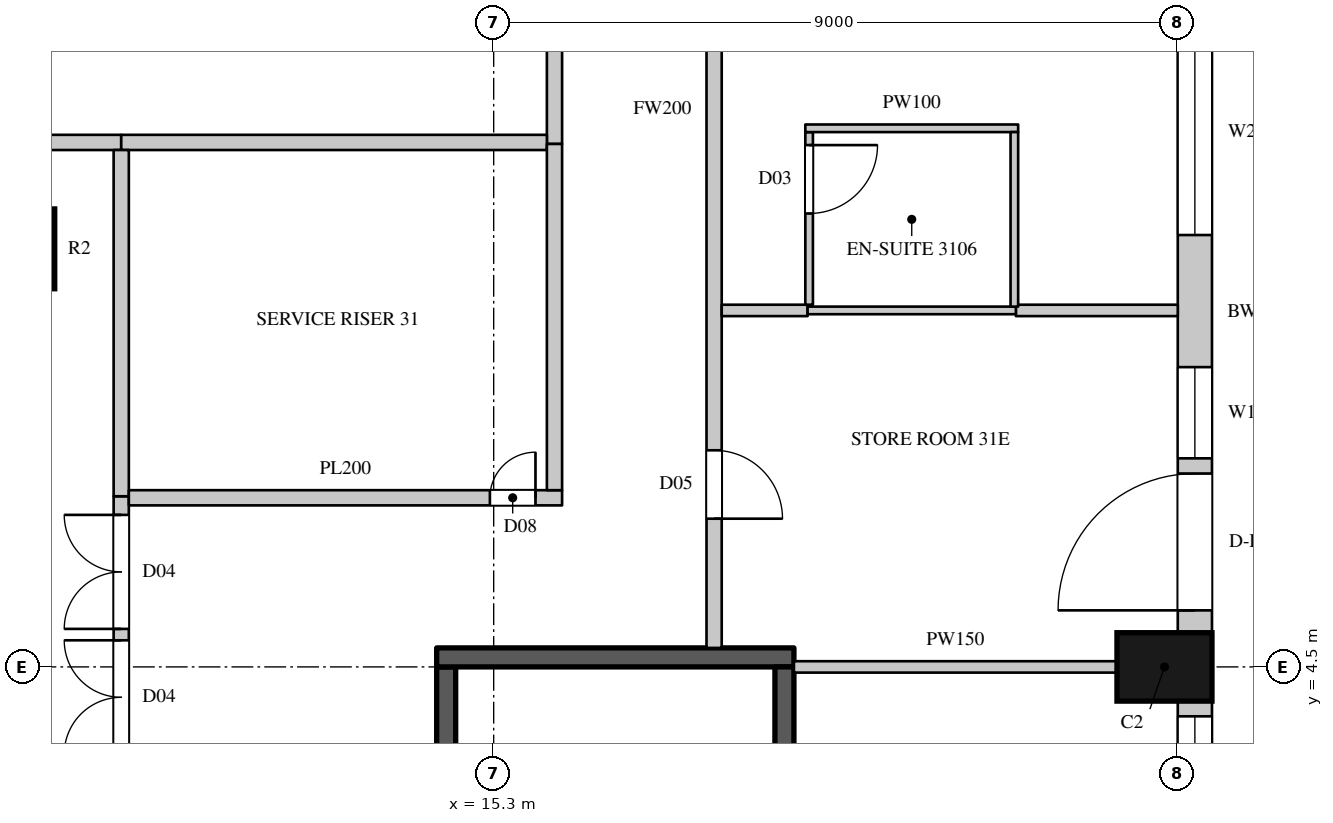
"""IFC4 building model, lengths in metres.
Left out: names, types, materials, properties, quantities, classifications, styles, units other than length and angle.
Written with IfcOpenShell. Run it as: python <this file> out.ifc"""

import sys

from ifc_helpers import new_model, si_unit, direction, frame, frame_2d, origin, origin_2d, place, context, subcontext, project, spatial, rectangle, circle, extrude, element, fill, save


model = new_model("IFC4")
c1 = context("Model", 3, precision=1e-05, world=origin(), true_north=direction((0.0, 1.0)))
c2 = subcontext(c1, "Body", "Model", "MODEL_VIEW")
j1 = project(units=[si_unit("LENGTHUNIT", "METRE"), si_unit("PLANEANGLEUNIT", "RADIAN")], contexts=[c1])
p1 = place(None, origin())
s1 = spatial("IfcSite", under=j1, at=p1, CompositionType="ELEMENT")
p2 = place(p1, origin())
s2 = spatial("IfcBuilding", under=s1, at=p2, CompositionType="ELEMENT")
p3 = place(p2, frame((0.0, 0.0, 141.9)))
s3 = spatial("IfcBuildingStorey", under=s2, at=p3, CompositionType="ELEMENT", Elevation=141.9)
p4 = place(p3, frame((24.125, 4.5, 0.0), z_axis=(0.0, 0.0, 1.0), x_axis=(0.0, 1.0, 0.0)))
e1 = element("IfcColumn", 1, at=p4, inside=s3, PredefinedType="COLUMN", context=c2, shape_type="SweptSolid", body=[
    extrude(rectangle(XDim=0.9, YDim=1.25, at=origin_2d()), origin(), (0.0, 0.0, 1.0), 3.6),
])
p5 = place(p3, frame((9.0, 10.0, 0.0), z_axis=(0.0, 0.0, 1.0), x_axis=(1.0, 0.0, 0.0)))
e2 = element("IfcColumn", 2, at=p5, inside=s3, PredefinedType="COLUMN", context=c2, shape_type="SweptSolid", body=[
    extrude(circle(Radius=0.525, at=origin_2d()), origin(), (0.0, 0.0, 1.0), 3.6),
])
p6 = place(p3, frame((24.525, -4.05, 0.0), z_axis=(0.0, 0.0, 1.0), x_axis=(0.0, 1.0, 0.0)))
e3 = element("IfcWall", 3, at=p6, inside=s3, PredefinedType="SOLIDWALL", context=c2, shape_type="SweptSolid", body=[
    extrude(rectangle(XDim=8.1, YDim=0.45, at=frame_2d((4.05, 0.0))), origin(), (0.0, 0.0, 1.0), 3.3),
])
p7 = place(p6, frame((0.2, 0.0, 0.0)))
e4 = element("IfcOpeningElement", 4, at=p7, cuts=e3, PredefinedType="OPENING", context=c2, shape_type="SweptSolid", body=[
    extrude(rectangle(XDim=1.8, YDim=2.4, at=frame_2d((0.9, 1.2))), frame((0.0, 0.235, 0.0), z_axis=(0.0, -1.0, 0.0), x_axis=(1.0, 0.0, 0.0)), (0.0, 0.0, 1.0), 0.47),
])
p8 = place(p6, frame((2.2, 0.0, 1.05)))
e5 = element("IfcOpeningElement", 5, at=p8, cuts=e3, PredefinedType="OPENING", context=c2, shape_type="SweptSolid", body=[
    extrude(rectangle(XDim=1.2, YDim=2.0, at=frame_2d((0.6, 1.0))), frame((0.0, 0.235, 0.0), z_axis=(0.0, -1.0, 0.0), x_axis=(1.0, 0.0, 0.0)), (0.0, 0.0, 1.0), 0.47),
])
p9 = place(p6, frame((4.7, 0.0, 0.0)))
e6 = element("IfcOpeningElement", 6, at=p9, cuts=e3, PredefinedType="OPENING", context=c2, shape_type="SweptSolid", body=[
    extrude(rectangle(XDim=1.8, YDim=2.4, at=frame_2d((0.9, 1.2))), frame((0.0, 0.235, 0.0), z_axis=(0.0, -1.0, 0.0), x_axis=(1.0, 0.0, 0.0)), (0.0, 0.0, 1.0), 0.47),
])
p10 = place(p6, frame((6.7, 0.0, 1.05)))
e7 = element("IfcOpeningElement", 7, at=p10, cuts=e3, PredefinedType="OPENING", context=c2, shape_type="SweptSolid", body=[
    extrude(rectangle(XDim=1.2, YDim=2.0, at=frame_2d((0.6, 1.0))), frame((0.0, 0.235, 0.0), z_axis=(0.0, -1.0, 0.0), x_axis=(1.0, 0.0, 0.0)), (0.0, 0.0, 1.0), 0.47),
])
p11 = place(p3, frame((24.525, 4.95, 0.0), z_axis=(0.0, 0.0, 1.0), x_axis=(0.0, 1.0, 0.0)))
e8 = element("IfcWall", 8, at=p11, inside=s3, PredefinedType="SOLIDWALL", context=c2, shape_type="SweptSolid", body=[
    extrude(rectangle(XDim=8.439, YDim=0.45, at=frame_2d((4.219, 0.0))), origin(), (0.0, 0.0, 1.0), 3.3),
])
p12 = place(p11, frame((0.294, 0.0, 0.0)))
e9 = element("IfcOpeningElement", 9, at=p12, cuts=e8, PredefinedType="OPENING", context=c2, shape_type="SweptSolid", body=[
    extrude(rectangle(XDim=1.8, YDim=2.4, at=frame_2d((0.9, 1.2))), frame((0.0, 0.235, 0.0), z_axis=(0.0, -1.0, 0.0), x_axis=(1.0, 0.0, 0.0)), (0.0, 0.0, 1.0), 0.47),
])
p13 = place(p11, frame((2.294, 0.0, 1.05)))
e10 = element("IfcOpeningElement", 10, at=p13, cuts=e8, PredefinedType="OPENING", context=c2, shape_type="SweptSolid", body=[
    extrude(rectangle(XDim=1.2, YDim=2.0, at=frame_2d((0.6, 1.0))), frame((0.0, 0.235, 0.0), z_axis=(0.0, -1.0, 0.0), x_axis=(1.0, 0.0, 0.0)), (0.0, 0.0, 1.0), 0.47),
])
p14 = place(p11, frame((5.232, 0.0, 1.05)))
e11 = element("IfcOpeningElement", 11, at=p14, cuts=e8, PredefinedType="OPENING", context=c2, shape_type="SweptSolid", body=[
    extrude(rectangle(XDim=2.7, YDim=2.0, at=frame_2d((1.35, 1.0))), frame((0.0, 0.235, 0.0), z_axis=(0.0, -1.0, 0.0), x_axis=(1.0, 0.0, 0.0)), (0.0, 0.0, 1.0), 0.47),
])
p15 = place(p3, frame((-8.3, 11.4, 0.0), z_axis=(0.0, 0.0, 1.0), x_axis=(1.0, 0.0, 0.0)))
e12 = element("IfcWall", 12, at=p15, inside=s3, PredefinedType="PARTITIONING", context=c2, shape_type="SweptSolid", body=[
    extrude(rectangle(XDim=18.7, YDim=0.2, at=frame_2d((9.35, 0.0))), origin(), (0.0, 0.0, 1.0), 3.3),
])
p16 = place(p15, frame((6.9, 0.0, 0.0)))
e13 = element("IfcOpeningElement", 13, at=p16, cuts=e12, PredefinedType="OPENING", context=c2, shape_type="SweptSolid", body=[
    extrude(rectangle(XDim=1.5, YDim=2.2, at=frame_2d((0.75, 1.1))), frame((0.0, 0.11, 0.0), z_axis=(0.0, -1.0, 0.0), x_axis=(1.0, 0.0, 0.0)), (0.0, 0.0, 1.0), 0.22),
])
p17 = place(p3, frame((10.4, -11.3, 0.0), z_axis=(0.0, 0.0, 1.0), x_axis=(0.0, 1.0, 0.0)))
e14 = element("IfcWall", 14, at=p17, inside=s3, PredefinedType="PARTITIONING", context=c2, shape_type="SweptSolid", body=[
    extrude(rectangle(XDim=18.045, YDim=0.2, at=frame_2d((9.022, 0.0))), origin(), (0.0, 0.0, 1.0), 3.3),
])
p18 = place(p17, frame((16.3, 0.0, 0.0)))
e15 = element("IfcOpeningElement", 15, at=p18, cuts=e14, PredefinedType="OPENING", context=c2, shape_type="SweptSolid", body=[
    extrude(rectangle(XDim=1.5, YDim=2.2, at=frame_2d((0.75, 1.1))), frame((0.0, 0.11, 0.0), z_axis=(0.0, -1.0, 0.0), x_axis=(1.0, 0.0, 0.0)), (0.0, 0.0, 1.0), 0.22),
])
p19 = place(p17, frame((14.65, 0.0, 0.0)))
e16 = element("IfcOpeningElement", 16, at=p19, cuts=e14, PredefinedType="OPENING", context=c2, shape_type="SweptSolid", body=[
    extrude(rectangle(XDim=1.5, YDim=2.2, at=frame_2d((0.75, 1.1))), frame((0.0, 0.11, 0.0), z_axis=(0.0, -1.0, 0.0), x_axis=(1.0, 0.0, 0.0)), (0.0, 0.0, 1.0), 0.22),
])
p20 = place(p17, frame((9.1, 0.0, 0.0)))
e17 = element("IfcOpeningElement", 17, at=p20, cuts=e14, PredefinedType="OPENING", context=c2, shape_type="SweptSolid", body=[
    extrude(rectangle(XDim=1.5, YDim=2.2, at=frame_2d((0.75, 1.1))), frame((0.0, 0.11, 0.0), z_axis=(0.0, -1.0, 0.0), x_axis=(1.0, 0.0, 0.0)), (0.0, 0.0, 1.0), 0.22),
])
p21 = place(p3, frame((16.1, 11.38, 0.0), z_axis=(0.0, 0.0, 1.0), x_axis=(0.0, 1.0, 0.0)))
e18 = element("IfcWall", 18, at=p21, inside=s3, PredefinedType="PARTITIONING", context=c2, shape_type="SweptSolid", body=[
    extrude(rectangle(XDim=6.02, YDim=0.2, at=frame_2d((3.01, 0.0))), origin(), (0.0, 0.0, 1.0), 3.3),
])
p22 = place(p3, frame((18.2, 4.75, 0.0), z_axis=(0.0, 0.0, 1.0), x_axis=(0.0, 1.0, 0.0)))
e19 = element("IfcWall", 19, at=p22, inside=s3, PredefinedType="PARTITIONING", context=c2, shape_type="SweptSolid", body=[
    extrude(rectangle(XDim=14.164, YDim=0.2, at=frame_2d((7.082, 0.0))), origin(), (0.0, 0.0, 1.0), 3.3),
])
p23 = place(p22, frame((1.7, 0.0, 0.0)))
e20 = element("IfcOpeningElement", 20, at=p23, cuts=e19, PredefinedType="OPENING", context=c2, shape_type="SweptSolid", body=[
    extrude(rectangle(XDim=0.9, YDim=2.2, at=frame_2d((0.45, 1.1))), frame((0.0, 0.11, 0.0), z_axis=(0.0, -1.0, 0.0), x_axis=(1.0, 0.0, 0.0)), (0.0, 0.0, 1.0), 0.22),
])
p24 = place(p3, frame((18.3, 9.19, 0.0), z_axis=(0.0, 0.0, 1.0), x_axis=(1.0, 0.0, 0.0)))
e21 = element("IfcWall", 21, at=p24, inside=s3, PredefinedType="PARTITIONING", context=c2, shape_type="SweptSolid", body=[
    extrude(rectangle(XDim=1.13, YDim=0.15, at=frame_2d((0.565, 0.0))), origin(), (0.0, 0.0, 1.0), 3.3),
])
p25 = place(p3, frame((19.25, 4.5, 0.0), z_axis=(0.0, 0.0, 1.0), x_axis=(1.0, 0.0, 0.0)))
e22 = element("IfcWall", 22, at=p25, inside=s3, PredefinedType="PARTITIONING", context=c2, shape_type="SweptSolid", body=[
    extrude(rectangle(XDim=4.25, YDim=0.15, at=frame_2d((2.125, 0.0))), origin(), (0.0, 0.0, 1.0), 3.3),
])
p26 = place(p3, frame((22.17, 9.19, 0.0), z_axis=(0.0, 0.0, 1.0), x_axis=(1.0, 0.0, 0.0)))
e23 = element("IfcWall", 23, at=p26, inside=s3, PredefinedType="PARTITIONING", context=c2, shape_type="SweptSolid", body=[
    extrude(rectangle(XDim=2.13, YDim=0.15, at=frame_2d((1.065, 0.0))), origin(), (0.0, 0.0, 1.0), 3.3),
])
p27 = place(p3, frame((10.4, 11.4, 0.0), z_axis=(0.0, 0.0, 1.0), x_axis=(1.0, 0.0, 0.0)))
e24 = element("IfcWall", 24, at=p27, inside=s3, PredefinedType="PARTITIONING", context=c2, shape_type="SweptSolid", body=[
    extrude(rectangle(XDim=5.6, YDim=0.2, at=frame_2d((2.8, 0.0))), origin(), (0.0, 0.0, 1.0), 3.3),
])
p28 = place(p3, frame((10.4, 6.745, 0.0), z_axis=(0.0, 0.0, 1.0), x_axis=(0.0, 1.0, 0.0)))
e25 = element("IfcWall", 25, at=p28, inside=s3, PredefinedType="PARTITIONING", context=c2, shape_type="SweptSolid", body=[
    extrude(rectangle(XDim=4.555, YDim=0.2, at=frame_2d((2.277, 0.0))), origin(), (0.0, 0.0, 1.0), 3.3),
])
p29 = place(p3, frame((10.5, 6.725, 0.0), z_axis=(0.0, 0.0, 1.0), x_axis=(1.0, 0.0, 0.0)))
e26 = element("IfcWall", 26, at=p29, inside=s3, PredefinedType="PARTITIONING", context=c2, shape_type="SweptSolid", body=[
    extrude(rectangle(XDim=5.7, YDim=0.2, at=frame_2d((2.85, 0.0))), origin(), (0.0, 0.0, 1.0), 3.3),
])
p30 = place(p29, frame((4.75, 0.0, 0.0)))
e27 = element("IfcOpeningElement", 27, at=p30, cuts=e26, PredefinedType="OPENING", context=c2, shape_type="SweptSolid", body=[
    extrude(rectangle(XDim=0.6, YDim=2.0, at=frame_2d((0.3, 1.0))), frame((0.0, 0.11, 0.0), z_axis=(0.0, -1.0, 0.0), x_axis=(1.0, 0.0, 0.0)), (0.0, 0.0, 1.0), 0.22),
])
p31 = place(p3, frame((16.1, 6.825, 0.0), z_axis=(0.0, 0.0, 1.0), x_axis=(0.0, 1.0, 0.0)))
e28 = element("IfcWall", 28, at=p31, inside=s3, PredefinedType="PARTITIONING", context=c2, shape_type="SweptSolid", body=[
    extrude(rectangle(XDim=4.555, YDim=0.2, at=frame_2d((2.277, 0.0))), origin(), (0.0, 0.0, 1.0), 3.3),
])
p32 = place(p3, frame((14.675, -4.5, 0.0), z_axis=(0.0, 0.0, 1.0), x_axis=(0.0, 1.0, 0.0)))
e29 = element("IfcWall", 29, at=p32, inside=s3, PredefinedType="SHEAR", context=c2, shape_type="SweptSolid", body=[
    extrude(rectangle(XDim=9.0, YDim=0.25, at=frame_2d((4.5, 0.0))), origin(), (0.0, 0.0, 1.0), 3.3),
])
p33 = place(p32, frame((0.45, 0.0, 0.0)))
e30 = element("IfcOpeningElement", 30, at=p33, cuts=e29, PredefinedType="OPENING", context=c2, shape_type="SweptSolid", body=[
    extrude(rectangle(XDim=1.1, YDim=2.2, at=frame_2d((0.55, 1.1))), frame((0.0, 0.135, 0.0), z_axis=(0.0, -1.0, 0.0), x_axis=(1.0, 0.0, 0.0)), (0.0, 0.0, 1.0), 0.27),
])
p34 = place(p3, frame((14.55, 4.625, 0.0), z_axis=(0.0, 0.0, 1.0), x_axis=(1.0, 0.0, 0.0)))
e31 = element("IfcWall", 31, at=p34, inside=s3, PredefinedType="SHEAR", context=c2, shape_type="SweptSolid", body=[
    extrude(rectangle(XDim=4.7, YDim=0.25, at=frame_2d((2.35, 0.0))), origin(), (0.0, 0.0, 1.0), 3.3),
])
p35 = place(p3, frame((19.125, -4.5, 0.0), z_axis=(0.0, 0.0, 1.0), x_axis=(0.0, 1.0, 0.0)))
e32 = element("IfcWall", 32, at=p35, inside=s3, PredefinedType="SHEAR", context=c2, shape_type="SweptSolid", body=[
    extrude(rectangle(XDim=9.0, YDim=0.25, at=frame_2d((4.5, 0.0))), origin(), (0.0, 0.0, 1.0), 3.3),
])
p36 = place(p3, frame((19.43, 9.19, 0.0), z_axis=(0.0, 0.0, 1.0), x_axis=(1.0, 0.0, 0.0)))
e33 = element("IfcWall", 33, at=p36, inside=s3, PredefinedType="PARTITIONING", context=c2, shape_type="SweptSolid", body=[
    extrude(rectangle(XDim=2.74, YDim=0.1, at=frame_2d((1.37, 0.0))), origin(), (0.0, 0.0, 1.0), 3.3),
])
p37 = place(p3, frame((19.45, 9.265, 0.0), z_axis=(0.0, 0.0, 1.0), x_axis=(0.0, 1.0, 0.0)))
e34 = element("IfcWall", 34, at=p37, inside=s3, PredefinedType="PARTITIONING", context=c2, shape_type="SweptSolid", body=[
    extrude(rectangle(XDim=2.271, YDim=0.1, at=frame_2d((1.135, 0.0))), origin(), (0.0, 0.0, 1.0), 3.3),
])
p38 = place(p37, frame((1.2, 0.0, 0.0)))
e35 = element("IfcOpeningElement", 35, at=p38, cuts=e34, PredefinedType="OPENING", context=c2, shape_type="SweptSolid", body=[
    extrude(rectangle(XDim=0.9, YDim=2.2, at=frame_2d((0.45, 1.1))), frame((0.0, 0.06, 0.0), z_axis=(0.0, -1.0, 0.0), x_axis=(1.0, 0.0, 0.0)), (0.0, 0.0, 1.0), 0.12),
])
p39 = place(p3, frame((19.4, 11.586, 0.0), z_axis=(0.0, 0.0, 1.0), x_axis=(1.0, 0.0, 0.0)))
e36 = element("IfcWall", 36, at=p39, inside=s3, PredefinedType="PARTITIONING", context=c2, shape_type="SweptSolid", body=[
    extrude(rectangle(XDim=2.8, YDim=0.1, at=frame_2d((1.4, 0.0))), origin(), (0.0, 0.0, 1.0), 3.3),
])
p40 = place(p3, frame((22.15, 9.24, 0.0), z_axis=(0.0, 0.0, 1.0), x_axis=(0.0, 1.0, 0.0)))
e37 = element("IfcWall", 37, at=p40, inside=s3, PredefinedType="PARTITIONING", context=c2, shape_type="SweptSolid", body=[
    extrude(rectangle(XDim=2.296, YDim=0.1, at=frame_2d((1.148, 0.0))), origin(), (0.0, 0.0, 1.0), 3.3),
])
p41 = place(p10, origin())
e38 = element("IfcWindow", 38, at=p41, inside=s3, PartitioningType="SINGLE_PANEL", PredefinedType="WINDOW", context=c2, shape_type="SweptSolid", body=[
    extrude(rectangle(XDim=1.2, YDim=2.0, at=frame_2d((0.6, 1.0))), frame((0.0, 0.135, 0.0), z_axis=(0.0, -1.0, 0.0), x_axis=(1.0, 0.0, 0.0)), (0.0, 0.0, 1.0), 0.06),
])
fill(e7, e38)
p42 = place(p12, origin())
e39 = element("IfcDoor", 39, at=p42, inside=s3, OperationType="SLIDING_TO_LEFT", PredefinedType="DOOR", context=c2, shape_type="SweptSolid", body=[
    extrude(rectangle(XDim=1.8, YDim=2.4, at=frame_2d((0.9, 1.2))), frame((0.0, 0.13, 0.0), z_axis=(0.0, -1.0, 0.0), x_axis=(1.0, 0.0, 0.0)), (0.0, 0.0, 1.0), 0.05),
])
fill(e9, e39)
p43 = place(p13, origin())
e40 = element("IfcWindow", 40, at=p43, inside=s3, PartitioningType="SINGLE_PANEL", PredefinedType="WINDOW", context=c2, shape_type="SweptSolid", body=[
    extrude(rectangle(XDim=1.2, YDim=2.0, at=frame_2d((0.6, 1.0))), frame((0.0, 0.135, 0.0), z_axis=(0.0, -1.0, 0.0), x_axis=(1.0, 0.0, 0.0)), (0.0, 0.0, 1.0), 0.06),
])
fill(e10, e40)
p44 = place(p14, origin())
e41 = element("IfcWindow", 41, at=p44, inside=s3, PartitioningType="SINGLE_PANEL", PredefinedType="WINDOW", context=c2, shape_type="SweptSolid", body=[
    extrude(rectangle(XDim=2.7, YDim=2.0, at=frame_2d((1.35, 1.0))), frame((0.0, 0.135, 0.0), z_axis=(0.0, -1.0, 0.0), x_axis=(1.0, 0.0, 0.0)), (0.0, 0.0, 1.0), 0.06),
])
fill(e11, e41)
p45 = place(p18, origin())
e42 = element("IfcDoor", 42, at=p45, inside=s3, OperationType="DOUBLE_DOOR_SINGLE_SWING", PredefinedType="DOOR", context=c2, shape_type="SweptSolid", body=[
    extrude(rectangle(XDim=1.5, YDim=2.2, at=frame_2d((0.75, 1.1))), frame((0.0, 0.025, 0.0), z_axis=(0.0, -1.0, 0.0), x_axis=(1.0, 0.0, 0.0)), (0.0, 0.0, 1.0), 0.05),
])
fill(e15, e42)
p46 = place(p19, origin())
e43 = element("IfcDoor", 43, at=p46, inside=s3, OperationType="DOUBLE_DOOR_SINGLE_SWING", PredefinedType="DOOR", context=c2, shape_type="SweptSolid", body=[
    extrude(rectangle(XDim=1.5, YDim=2.2, at=frame_2d((0.75, 1.1))), frame((0.0, 0.025, 0.0), z_axis=(0.0, -1.0, 0.0), x_axis=(1.0, 0.0, 0.0)), (0.0, 0.0, 1.0), 0.05),
])
fill(e16, e43)
p47 = place(p30, origin())
e44 = element("IfcDoor", 44, at=p47, inside=s3, OperationType="SINGLE_SWING_RIGHT", PredefinedType="DOOR", context=c2, shape_type="SweptSolid", body=[
    extrude(rectangle(XDim=0.6, YDim=2.0, at=frame_2d((0.3, 1.0))), frame((0.0, 0.025, 0.0), z_axis=(0.0, -1.0, 0.0), x_axis=(1.0, 0.0, 0.0)), (0.0, 0.0, 1.0), 0.05),
])
fill(e27, e44)
p48 = place(p23, origin())
e45 = element("IfcDoor", 45, at=p48, inside=s3, OperationType="SINGLE_SWING_RIGHT", PredefinedType="DOOR", context=c2, shape_type="SweptSolid", body=[
    extrude(rectangle(XDim=0.9, YDim=2.2, at=frame_2d((0.45, 1.1))), frame((0.0, 0.025, 0.0), z_axis=(0.0, -1.0, 0.0), x_axis=(1.0, 0.0, 0.0)), (0.0, 0.0, 1.0), 0.05),
])
fill(e20, e45)
p49 = place(p38, origin())
e46 = element("IfcDoor", 46, at=p49, inside=s3, OperationType="SINGLE_SWING_LEFT", PredefinedType="DOOR", context=c2, shape_type="SweptSolid", body=[
    extrude(rectangle(XDim=0.9, YDim=2.2, at=frame_2d((0.45, 1.1))), frame((0.0, 0.025, 0.0), z_axis=(0.0, -1.0, 0.0), x_axis=(1.0, 0.0, 0.0)), (0.0, 0.0, 1.0), 0.05),
])
fill(e35, e46)
save(model, sys.argv[1])
